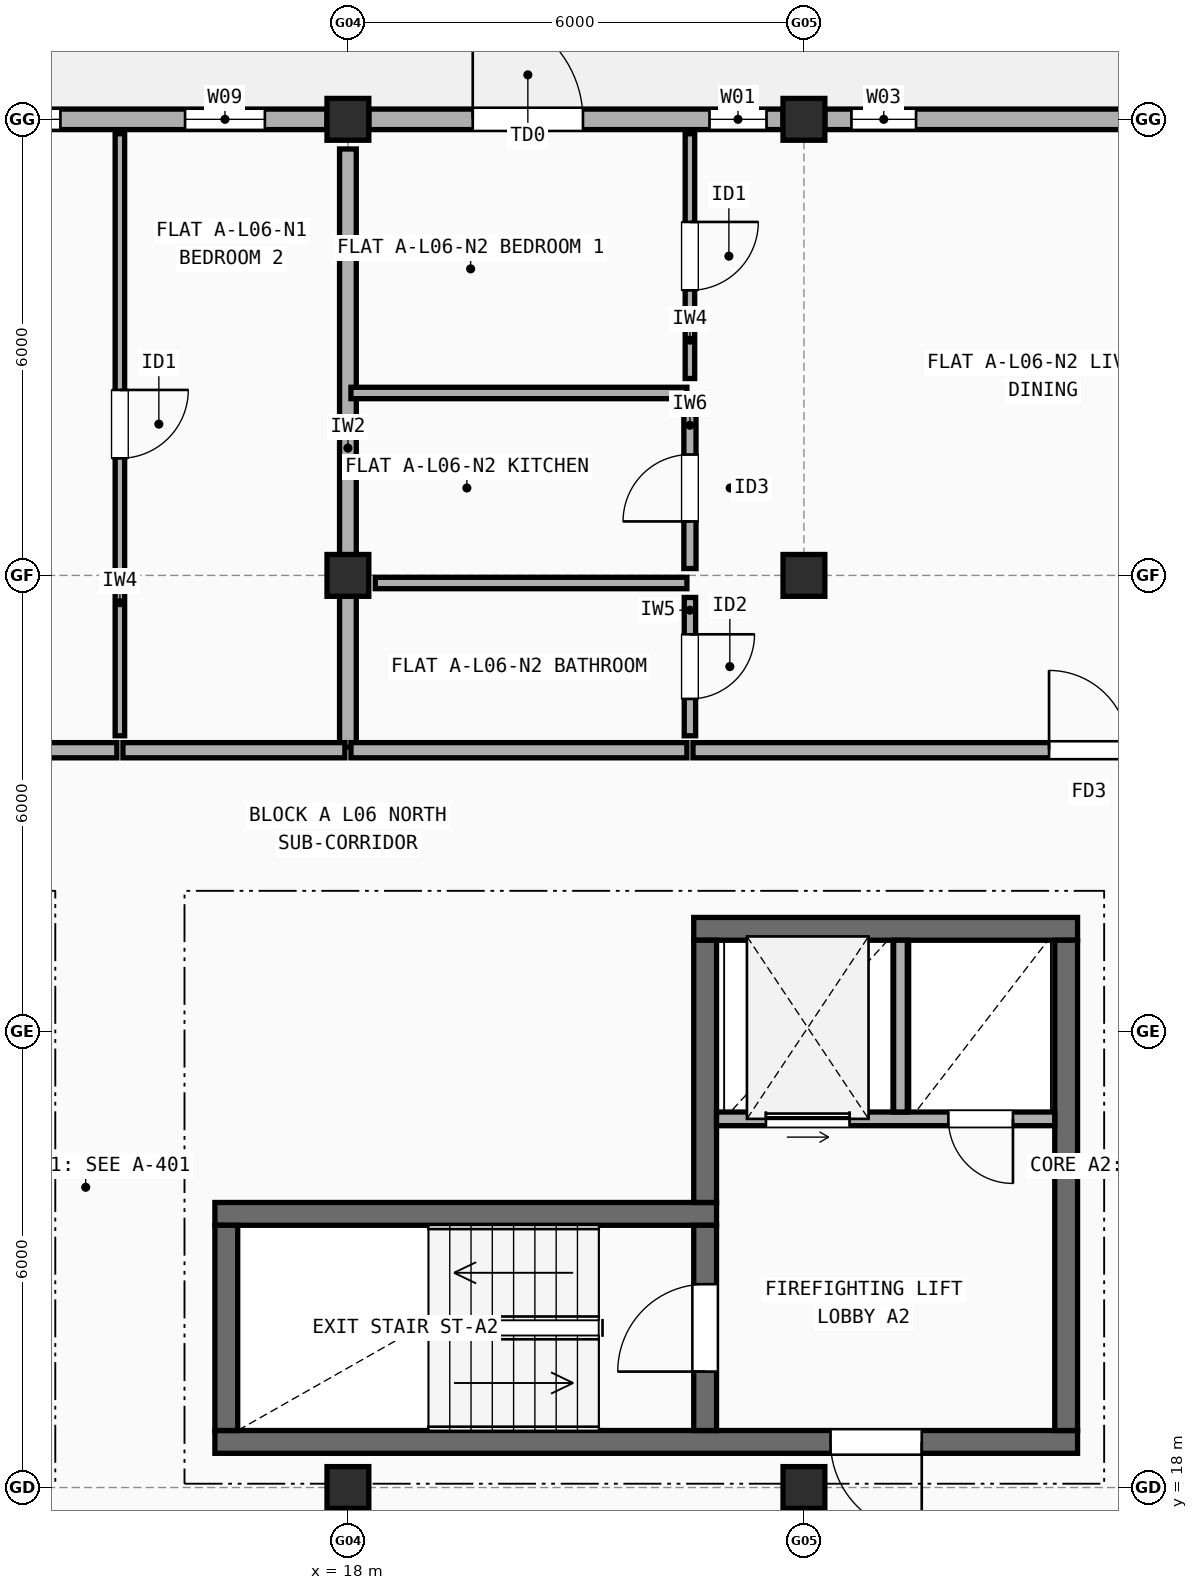
"""IFC4 building model, lengths in metres.
Left out: names, types, materials, properties, quantities, classifications, styles, units other than length and angle.
Written with IfcOpenShell. Run it as: python <this file> out.ifc"""

import sys

from ifc_helpers import new_model, si_unit, direction, frame, frame_2d, origin, origin_2d, place, context, subcontext, project, spatial, rectangle, extrude, element, fill, save


model = new_model("IFC4")
c1 = context("Model", 3, precision=1e-05, world=origin(), true_north=direction((0.0, 1.0)))
c2 = subcontext(c1, "Body", "Model", "MODEL_VIEW")
j1 = project(units=[si_unit("LENGTHUNIT", "METRE"), si_unit("PLANEANGLEUNIT", "RADIAN")], contexts=[c1])
p1 = place(None, origin())
s1 = spatial("IfcSite", under=j1, at=p1, CompositionType="ELEMENT")
p2 = place(p1, origin())
s2 = spatial("IfcBuilding", under=s1, at=p2, CompositionType="ELEMENT")
p3 = place(p2, frame((0.0, 0.0, 20.5)))
s3 = spatial("IfcBuildingStorey", under=s2, at=p3, CompositionType="ELEMENT", Elevation=20.5)
for number, where, z_axis, x_axis in (
    (1, (18.0, 18.0, 0.0), (0.0, 0.0, 1.0), (1.0, 0.0, 0.0)),
    (2, (18.0, 30.0, 0.0), (0.0, 0.0, 1.0), (1.0, 0.0, 0.0)),
    (3, (18.0, 36.0, 0.0), (0.0, 0.0, 1.0), (1.0, 0.0, 0.0)),
    (4, (24.0, 18.0, 0.0), (0.0, 0.0, 1.0), (1.0, 0.0, 0.0)),
    (5, (24.0, 30.0, 0.0), (0.0, 0.0, 1.0), (1.0, 0.0, 0.0)),
    (6, (24.0, 36.0, 0.0), (0.0, 0.0, 1.0), (1.0, 0.0, 0.0)),
):
    element("IfcColumn", number, at=place(p3, frame(where, z_axis=z_axis, x_axis=x_axis)), inside=s3, PredefinedType="COLUMN", context=c2, shape_type="SweptSolid", body=[
        extrude(rectangle(XDim=0.55, YDim=0.55, at=origin_2d()), origin(), (0.0, 0.0, 1.0), 2.97),
    ])
p4 = place(p3, frame((29.75, 36.0, 0.0), z_axis=(0.0, 0.0, 1.0), x_axis=(-1.0, 0.0, 0.0)))
e7 = element("IfcWall", 7, at=p4, inside=s3, PredefinedType="STANDARD", context=c2, shape_type="SweptSolid", body=[
    extrude(rectangle(XDim=5.475, YDim=0.27, at=frame_2d((2.738, 0.0))), origin(), (0.0, 0.0, 1.0), 2.452),
])
p5 = place(p4, frame((0.35, 0.0, 0.9)))
e8 = element("IfcOpeningElement", 8, at=p5, cuts=e7, PredefinedType="OPENING", context=c2, shape_type="SweptSolid", body=[
    extrude(rectangle(XDim=0.85, YDim=1.25, at=frame_2d((0.425, 0.625))), frame((0.0, 0.145, 0.0), z_axis=(0.0, -1.0, 0.0), x_axis=(1.0, 0.0, 0.0)), (0.0, 0.0, 1.0), 0.29),
])
p6 = place(p4, frame((4.275, 0.0, 0.9)))
e9 = element("IfcOpeningElement", 9, at=p6, cuts=e7, PredefinedType="OPENING", context=c2, shape_type="SweptSolid", body=[
    extrude(rectangle(XDim=0.85, YDim=1.25, at=frame_2d((0.425, 0.625))), frame((0.0, 0.145, 0.0), z_axis=(0.0, -1.0, 0.0), x_axis=(1.0, 0.0, 0.0)), (0.0, 0.0, 1.0), 0.29),
])
p7 = place(p3, frame((23.725, 36.0, 0.0), z_axis=(0.0, 0.0, 1.0), x_axis=(-1.0, 0.0, 0.0)))
e10 = element("IfcWall", 10, at=p7, inside=s3, PredefinedType="STANDARD", context=c2, shape_type="SweptSolid", body=[
    extrude(rectangle(XDim=5.45, YDim=0.27, at=frame_2d((2.725, 0.0))), origin(), (0.0, 0.0, 1.0), 2.452),
])
p8 = place(p7, frame((2.633, 0.0, 0.0)))
e11 = element("IfcOpeningElement", 11, at=p8, cuts=e10, PredefinedType="OPENING", context=c2, shape_type="SweptSolid", body=[
    extrude(rectangle(XDim=1.45, YDim=2.15, at=frame_2d((0.725, 1.075))), frame((0.0, 0.145, 0.0), z_axis=(0.0, -1.0, 0.0), x_axis=(1.0, 0.0, 0.0)), (0.0, 0.0, 1.0), 0.29),
])
p9 = place(p7, frame((0.218, 0.0, 0.9)))
e12 = element("IfcOpeningElement", 12, at=p9, cuts=e10, PredefinedType="OPENING", context=c2, shape_type="SweptSolid", body=[
    extrude(rectangle(XDim=0.75, YDim=1.15, at=frame_2d((0.375, 0.575))), frame((0.0, 0.145, 0.0), z_axis=(0.0, -1.0, 0.0), x_axis=(1.0, 0.0, 0.0)), (0.0, 0.0, 1.0), 0.29),
])
p10 = place(p3, frame((17.725, 36.0, 0.0), z_axis=(0.0, 0.0, 1.0), x_axis=(-1.0, 0.0, 0.0)))
e13 = element("IfcWall", 13, at=p10, inside=s3, PredefinedType="STANDARD", context=c2, shape_type="SweptSolid", body=[
    extrude(rectangle(XDim=5.45, YDim=0.27, at=frame_2d((2.725, 0.0))), origin(), (0.0, 0.0, 1.0), 2.452),
])
p11 = place(p10, frame((0.817, 0.0, 0.9)))
e14 = element("IfcOpeningElement", 14, at=p11, cuts=e13, PredefinedType="OPENING", context=c2, shape_type="SweptSolid", body=[
    extrude(rectangle(XDim=1.05, YDim=1.35, at=frame_2d((0.525, 0.675))), frame((0.0, 0.145, 0.0), z_axis=(0.0, -1.0, 0.0), x_axis=(1.0, 0.0, 0.0)), (0.0, 0.0, 1.0), 0.29),
])
p12 = place(p10, frame((3.508, 0.0, 0.9)))
e15 = element("IfcOpeningElement", 15, at=p12, cuts=e13, PredefinedType="OPENING", context=c2, shape_type="SweptSolid", body=[
    extrude(rectangle(XDim=1.2, YDim=1.35, at=frame_2d((0.6, 0.675))), frame((0.0, 0.145, 0.0), z_axis=(0.0, -1.0, 0.0), x_axis=(1.0, 0.0, 0.0)), (0.0, 0.0, 1.0), 0.29),
])
p13 = place(p3, frame((16.25, 18.6, 0.0), z_axis=(0.0, 0.0, 1.0), x_axis=(1.0, 0.0, 0.0)))
e16 = element("IfcWall", 16, at=p13, inside=s3, PredefinedType="SHEAR", context=c2, shape_type="SweptSolid", body=[
    extrude(rectangle(XDim=11.35, YDim=0.3, at=frame_2d((5.675, 0.0))), origin(), (0.0, 0.0, 1.0), 2.97),
])
p14 = place(p13, frame((8.1, 0.0, 0.0)))
e17 = element("IfcOpeningElement", 17, at=p14, cuts=e16, PredefinedType="OPENING", context=c2, shape_type="SweptSolid", body=[
    extrude(rectangle(XDim=1.2, YDim=2.15, at=frame_2d((0.6, 1.075))), frame((0.0, 0.16, 0.0), z_axis=(0.0, -1.0, 0.0), x_axis=(1.0, 0.0, 0.0)), (0.0, 0.0, 1.0), 0.32),
])
p15 = place(p3, frame((22.85, 21.6, 0.0), z_axis=(0.0, 0.0, 1.0), x_axis=(-1.0, 0.0, 0.0)))
e18 = element("IfcWall", 18, at=p15, inside=s3, PredefinedType="SHEAR", context=c2, shape_type="SweptSolid", body=[
    extrude(rectangle(XDim=6.6, YDim=0.3, at=frame_2d((3.3, 0.0))), origin(), (0.0, 0.0, 1.0), 2.97),
])
p16 = place(p3, frame((16.4, 21.45, 0.0), z_axis=(0.0, 0.0, 1.0), x_axis=(0.0, -1.0, 0.0)))
e19 = element("IfcWall", 19, at=p16, inside=s3, PredefinedType="SHEAR", context=c2, shape_type="SweptSolid", body=[
    extrude(rectangle(XDim=2.7, YDim=0.3, at=frame_2d((1.35, 0.0))), origin(), (0.0, 0.0, 1.0), 2.97),
])
p17 = place(p3, frame((22.7, 18.75, 0.0), z_axis=(0.0, 0.0, 1.0), x_axis=(0.0, 1.0, 0.0)))
e20 = element("IfcWall", 20, at=p17, inside=s3, PredefinedType="SHEAR", context=c2, shape_type="SweptSolid", body=[
    extrude(rectangle(XDim=2.7, YDim=0.3, at=frame_2d((1.35, 0.0))), origin(), (0.0, 0.0, 1.0), 2.97),
])
p18 = place(p17, frame((0.775, 0.0, 0.0)))
e21 = element("IfcOpeningElement", 21, at=p18, cuts=e20, PredefinedType="OPENING", context=c2, shape_type="SweptSolid", body=[
    extrude(rectangle(XDim=1.15, YDim=2.15, at=frame_2d((0.575, 1.075))), frame((0.0, 0.16, 0.0), z_axis=(0.0, -1.0, 0.0), x_axis=(1.0, 0.0, 0.0)), (0.0, 0.0, 1.0), 0.32),
])
p19 = place(p3, frame((27.6, 25.35, 0.0), z_axis=(0.0, 0.0, 1.0), x_axis=(-1.0, 0.0, 0.0)))
e22 = element("IfcWall", 22, at=p19, inside=s3, PredefinedType="SHEAR", context=c2, shape_type="SweptSolid", body=[
    extrude(rectangle(XDim=5.05, YDim=0.3, at=frame_2d((2.525, 0.0))), origin(), (0.0, 0.0, 1.0), 2.97),
])
p20 = place(p3, frame((27.45, 18.75, 0.0), z_axis=(0.0, 0.0, 1.0), x_axis=(0.0, 1.0, 0.0)))
e23 = element("IfcWall", 23, at=p20, inside=s3, PredefinedType="SHEAR", context=c2, shape_type="SweptSolid", body=[
    extrude(rectangle(XDim=6.45, YDim=0.3, at=frame_2d((3.225, 0.0))), origin(), (0.0, 0.0, 1.0), 2.97),
])
p21 = place(p3, frame((22.7, 21.75, 0.0), z_axis=(0.0, 0.0, 1.0), x_axis=(0.0, 1.0, 0.0)))
e24 = element("IfcWall", 24, at=p21, inside=s3, PredefinedType="SHEAR", context=c2, shape_type="SweptSolid", body=[
    extrude(rectangle(XDim=3.45, YDim=0.3, at=frame_2d((1.725, 0.0))), origin(), (0.0, 0.0, 1.0), 2.97),
])
p22 = place(p3, frame((22.85, 22.85, 0.0), z_axis=(0.0, 0.0, 1.0), x_axis=(1.0, 0.0, 0.0)))
e25 = element("IfcWall", 25, at=p22, inside=s3, PredefinedType="SOLIDWALL", context=c2, shape_type="SweptSolid", body=[
    extrude(rectangle(XDim=4.45, YDim=0.18, at=frame_2d((2.225, 0.0))), origin(), (0.0, 0.0, 1.0), 2.97),
])
p23 = place(p22, frame((0.65, 0.0, 0.0)))
e26 = element("IfcOpeningElement", 26, at=p23, cuts=e25, PredefinedType="OPENING", context=c2, shape_type="SweptSolid", body=[
    extrude(rectangle(XDim=1.1, YDim=2.15, at=frame_2d((0.55, 1.075))), frame((0.0, 0.1, 0.0), z_axis=(0.0, -1.0, 0.0), x_axis=(1.0, 0.0, 0.0)), (0.0, 0.0, 1.0), 0.2),
])
p24 = place(p22, frame((3.05, 0.0, 0.0)))
e27 = element("IfcOpeningElement", 27, at=p24, cuts=e25, PredefinedType="OPENING", context=c2, shape_type="SweptSolid", body=[
    extrude(rectangle(XDim=0.85, YDim=2.1, at=frame_2d((0.425, 1.05))), frame((0.0, 0.1, 0.0), z_axis=(0.0, -1.0, 0.0), x_axis=(1.0, 0.0, 0.0)), (0.0, 0.0, 1.0), 0.2),
])
p25 = place(p3, frame((25.27, 22.94, 0.0), z_axis=(0.0, 0.0, 1.0), x_axis=(0.0, 1.0, 0.0)))
e28 = element("IfcWall", 28, at=p25, inside=s3, PredefinedType="SOLIDWALL", context=c2, shape_type="SweptSolid", body=[
    extrude(rectangle(XDim=2.26, YDim=0.18, at=frame_2d((1.13, 0.0))), origin(), (0.0, 0.0, 1.0), 2.97),
])
p26 = place(p3, frame((18.0, 27.74, 0.0), z_axis=(0.0, 0.0, 1.0), x_axis=(0.0, 1.0, 0.0)))
e29 = element("IfcWall", 29, at=p26, inside=s3, PredefinedType="SOLIDWALL", context=c2, shape_type="SweptSolid", body=[
    extrude(rectangle(XDim=7.87, YDim=0.22, at=frame_2d((3.935, 0.0))), origin(), (0.0, 0.0, 1.0), 2.458),
])
p27 = place(p3, frame((4.54, 27.7, 0.0), z_axis=(0.0, 0.0, 1.0), x_axis=(1.0, 0.0, 0.0)))
e30 = element("IfcWall", 30, at=p27, inside=s3, PredefinedType="SOLIDWALL", context=c2, shape_type="SweptSolid", body=[
    extrude(rectangle(XDim=10.42, YDim=0.2, at=frame_2d((5.21, 0.0))), origin(), (0.0, 0.0, 1.0), 2.508),
])
p28 = place(p27, frame((4.71, 0.0, 0.0)))
e31 = element("IfcOpeningElement", 31, at=p28, cuts=e30, PredefinedType="OPENING", context=c2, shape_type="SweptSolid", body=[
    extrude(rectangle(XDim=1.0, YDim=2.15, at=frame_2d((0.5, 1.075))), frame((0.0, 0.11, 0.0), z_axis=(0.0, -1.0, 0.0), x_axis=(1.0, 0.0, 0.0)), (0.0, 0.0, 1.0), 0.22),
])
p29 = place(p3, frame((15.04, 27.7, 0.0), z_axis=(0.0, 0.0, 1.0), x_axis=(1.0, 0.0, 0.0)))
e32 = element("IfcWall", 32, at=p29, inside=s3, PredefinedType="SOLIDWALL", context=c2, shape_type="SweptSolid", body=[
    extrude(rectangle(XDim=2.92, YDim=0.2, at=frame_2d((1.46, 0.0))), origin(), (0.0, 0.0, 1.0), 2.97),
])
p30 = place(p3, frame((15.0, 27.89, 0.0), z_axis=(0.0, 0.0, 1.0), x_axis=(0.0, 1.0, 0.0)))
e33 = element("IfcWall", 33, at=p30, inside=s3, PredefinedType="PARTITIONING", context=c2, shape_type="SweptSolid", body=[
    extrude(rectangle(XDim=7.92, YDim=0.125, at=frame_2d((3.96, 0.0))), origin(), (0.0, 0.0, 1.0), 2.452),
])
p31 = place(p30, frame((3.65, 0.0, 0.0)))
e34 = element("IfcOpeningElement", 34, at=p31, cuts=e33, PredefinedType="OPENING", context=c2, shape_type="SweptSolid", body=[
    extrude(rectangle(XDim=0.9, YDim=2.1, at=frame_2d((0.45, 1.05))), frame((0.0, 0.073, 0.0), z_axis=(0.0, -1.0, 0.0), x_axis=(1.0, 0.0, 0.0)), (0.0, 0.0, 1.0), 0.145),
])
p32 = place(p3, frame((18.04, 27.7, 0.0), z_axis=(0.0, 0.0, 1.0), x_axis=(1.0, 0.0, 0.0)))
e35 = element("IfcWall", 35, at=p32, inside=s3, PredefinedType="SOLIDWALL", context=c2, shape_type="SweptSolid", body=[
    extrude(rectangle(XDim=4.42, YDim=0.2, at=frame_2d((2.21, 0.0))), origin(), (0.0, 0.0, 1.0), 2.97),
])
p33 = place(p3, frame((22.54, 27.7, 0.0), z_axis=(0.0, 0.0, 1.0), x_axis=(1.0, 0.0, 0.0)))
e36 = element("IfcWall", 36, at=p33, inside=s3, PredefinedType="SOLIDWALL", context=c2, shape_type="SweptSolid", body=[
    extrude(rectangle(XDim=10.42, YDim=0.2, at=frame_2d((5.21, 0.0))), origin(), (0.0, 0.0, 1.0), 2.452),
])
p34 = place(p33, frame((4.685, 0.0, 0.0)))
e37 = element("IfcOpeningElement", 37, at=p34, cuts=e36, PredefinedType="OPENING", context=c2, shape_type="SweptSolid", body=[
    extrude(rectangle(XDim=1.05, YDim=2.15, at=frame_2d((0.525, 1.075))), frame((0.0, 0.11, 0.0), z_axis=(0.0, -1.0, 0.0), x_axis=(1.0, 0.0, 0.0)), (0.0, 0.0, 1.0), 0.22),
])
p35 = place(p3, frame((22.5, 32.59, 0.0), z_axis=(0.0, 0.0, 1.0), x_axis=(0.0, 1.0, 0.0)))
e38 = element("IfcWall", 38, at=p35, inside=s3, PredefinedType="PARTITIONING", context=c2, shape_type="SweptSolid", body=[
    extrude(rectangle(XDim=3.22, YDim=0.125, at=frame_2d((1.61, 0.0))), origin(), (0.0, 0.0, 1.0), 2.97),
])
p36 = place(p35, frame((1.16, 0.0, 0.0)))
e39 = element("IfcOpeningElement", 39, at=p36, cuts=e38, PredefinedType="OPENING", context=c2, shape_type="SweptSolid", body=[
    extrude(rectangle(XDim=0.9, YDim=2.1, at=frame_2d((0.45, 1.05))), frame((0.0, 0.073, 0.0), z_axis=(0.0, -1.0, 0.0), x_axis=(1.0, 0.0, 0.0)), (0.0, 0.0, 1.0), 0.145),
])
p37 = place(p3, frame((22.5, 30.09, 0.0), z_axis=(0.0, 0.0, 1.0), x_axis=(0.0, 1.0, 0.0)))
e40 = element("IfcWall", 40, at=p37, inside=s3, PredefinedType="PLUMBINGWALL", context=c2, shape_type="SweptSolid", body=[
    extrude(rectangle(XDim=2.12, YDim=0.16, at=frame_2d((1.06, 0.0))), origin(), (0.0, 0.0, 1.0), 2.452),
])
p38 = place(p37, frame((0.62, 0.0, 0.0)))
e41 = element("IfcOpeningElement", 41, at=p38, cuts=e40, PredefinedType="OPENING", context=c2, shape_type="SweptSolid", body=[
    extrude(rectangle(XDim=0.88, YDim=2.1, at=frame_2d((0.44, 1.05))), frame((0.0, 0.09, 0.0), z_axis=(0.0, -1.0, 0.0), x_axis=(1.0, 0.0, 0.0)), (0.0, 0.0, 1.0), 0.18),
])
p39 = place(p3, frame((22.5, 27.89, 0.0), z_axis=(0.0, 0.0, 1.0), x_axis=(0.0, 1.0, 0.0)))
e42 = element("IfcWall", 42, at=p39, inside=s3, PredefinedType="PARTITIONING", context=c2, shape_type="SweptSolid", body=[
    extrude(rectangle(XDim=1.82, YDim=0.15, at=frame_2d((0.91, 0.0))), origin(), (0.0, 0.0, 1.0), 2.97),
])
p40 = place(p39, frame((0.485, 0.0, 0.0)))
e43 = element("IfcOpeningElement", 43, at=p40, cuts=e42, PredefinedType="OPENING", context=c2, shape_type="SweptSolid", body=[
    extrude(rectangle(XDim=0.85, YDim=2.1, at=frame_2d((0.425, 1.05))), frame((0.0, 0.085, 0.0), z_axis=(0.0, -1.0, 0.0), x_axis=(1.0, 0.0, 0.0)), (0.0, 0.0, 1.0), 0.17),
])
p41 = place(p3, frame((18.04, 32.4, 0.0), z_axis=(0.0, 0.0, 1.0), x_axis=(1.0, 0.0, 0.0)))
e44 = element("IfcWall", 44, at=p41, inside=s3, PredefinedType="PARTITIONING", context=c2, shape_type="SweptSolid", body=[
    extrude(rectangle(XDim=4.42, YDim=0.15, at=frame_2d((2.21, 0.0))), origin(), (0.0, 0.0, 1.0), 2.458),
])
p42 = place(p3, frame((18.36, 29.9, 0.0), z_axis=(0.0, 0.0, 1.0), x_axis=(1.0, 0.0, 0.0)))
e45 = element("IfcWall", 45, at=p42, inside=s3, PredefinedType="PARTITIONING", context=c2, shape_type="SweptSolid", body=[
    extrude(rectangle(XDim=4.1, YDim=0.15, at=frame_2d((2.05, 0.0))), origin(), (0.0, 0.0, 1.0), 2.452),
])
p43 = place(p6, origin())
e46 = element("IfcWindow", 46, at=p43, inside=s3, PartitioningType="SINGLE_PANEL", PredefinedType="WINDOW", context=c2, shape_type="SweptSolid", body=[
    extrude(rectangle(XDim=0.85, YDim=1.25, at=frame_2d((0.425, 0.625))), frame((0.0, 0.03, 0.0), z_axis=(0.0, -1.0, 0.0), x_axis=(1.0, 0.0, 0.0)), (0.0, 0.0, 1.0), 0.06),
])
fill(e9, e46)
p44 = place(p8, frame((1.45, 0.0, 0.0), z_axis=(0.0, 0.0, 1.0), x_axis=(-1.0, 0.0, 0.0)))
e47 = element("IfcDoor", 47, at=p44, inside=s3, OperationType="SINGLE_SWING_RIGHT", PredefinedType="DOOR", context=c2, shape_type="SweptSolid", body=[
    extrude(rectangle(XDim=1.45, YDim=2.15, at=frame_2d((0.725, 1.075))), frame((0.0, 0.025, 0.0), z_axis=(0.0, -1.0, 0.0), x_axis=(1.0, 0.0, 0.0)), (0.0, 0.0, 1.0), 0.05),
])
fill(e11, e47)
p45 = place(p9, origin())
e48 = element("IfcWindow", 48, at=p45, inside=s3, PartitioningType="SINGLE_PANEL", PredefinedType="WINDOW", context=c2, shape_type="SweptSolid", body=[
    extrude(rectangle(XDim=0.75, YDim=1.15, at=frame_2d((0.375, 0.575))), frame((0.0, 0.03, 0.0), z_axis=(0.0, -1.0, 0.0), x_axis=(1.0, 0.0, 0.0)), (0.0, 0.0, 1.0), 0.06),
])
fill(e12, e48)
p46 = place(p11, origin())
e49 = element("IfcWindow", 49, at=p46, inside=s3, PartitioningType="SINGLE_PANEL", PredefinedType="WINDOW", context=c2, shape_type="SweptSolid", body=[
    extrude(rectangle(XDim=1.05, YDim=1.35, at=frame_2d((0.525, 0.675))), frame((0.0, 0.03, 0.0), z_axis=(0.0, -1.0, 0.0), x_axis=(1.0, 0.0, 0.0)), (0.0, 0.0, 1.0), 0.06),
])
fill(e14, e49)
p47 = place(p12, origin())
e50 = element("IfcWindow", 50, at=p47, inside=s3, PartitioningType="SINGLE_PANEL", PredefinedType="WINDOW", context=c2, shape_type="SweptSolid", body=[
    extrude(rectangle(XDim=1.2, YDim=1.35, at=frame_2d((0.6, 0.675))), frame((0.0, 0.03, 0.0), z_axis=(0.0, -1.0, 0.0), x_axis=(1.0, 0.0, 0.0)), (0.0, 0.0, 1.0), 0.06),
])
fill(e15, e50)
p48 = place(p14, origin())
e51 = element("IfcDoor", 51, at=p48, inside=s3, OperationType="SINGLE_SWING_RIGHT", PredefinedType="DOOR", context=c2, shape_type="SweptSolid", body=[
    extrude(rectangle(XDim=1.2, YDim=2.15, at=frame_2d((0.6, 1.075))), frame((0.0, 0.025, 0.0), z_axis=(0.0, -1.0, 0.0), x_axis=(1.0, 0.0, 0.0)), (0.0, 0.0, 1.0), 0.05),
])
fill(e17, e51)
p49 = place(p18, origin())
e52 = element("IfcDoor", 52, at=p49, inside=s3, OperationType="SINGLE_SWING_LEFT", PredefinedType="DOOR", context=c2, shape_type="SweptSolid", body=[
    extrude(rectangle(XDim=1.15, YDim=2.15, at=frame_2d((0.575, 1.075))), frame((0.0, 0.025, 0.0), z_axis=(0.0, -1.0, 0.0), x_axis=(1.0, 0.0, 0.0)), (0.0, 0.0, 1.0), 0.05),
])
fill(e21, e52)
p50 = place(p23, origin())
e53 = element("IfcDoor", 53, at=p50, inside=s3, OperationType="SLIDING_TO_LEFT", PredefinedType="DOOR", context=c2, shape_type="SweptSolid", body=[
    extrude(rectangle(XDim=1.1, YDim=2.15, at=frame_2d((0.55, 1.075))), frame((0.0, 0.025, 0.0), z_axis=(0.0, -1.0, 0.0), x_axis=(1.0, 0.0, 0.0)), (0.0, 0.0, 1.0), 0.05),
])
fill(e26, e53)
p51 = place(p24, frame((0.85, 0.0, 0.0), z_axis=(0.0, 0.0, 1.0), x_axis=(-1.0, 0.0, 0.0)))
e54 = element("IfcDoor", 54, at=p51, inside=s3, OperationType="SINGLE_SWING_RIGHT", PredefinedType="DOOR", context=c2, shape_type="SweptSolid", body=[
    extrude(rectangle(XDim=0.85, YDim=2.1, at=frame_2d((0.425, 1.05))), frame((0.0, 0.025, 0.0), z_axis=(0.0, -1.0, 0.0), x_axis=(1.0, 0.0, 0.0)), (0.0, 0.0, 1.0), 0.05),
])
fill(e27, e54)
p52 = place(p31, origin())
e55 = element("IfcDoor", 55, at=p52, inside=s3, OperationType="SINGLE_SWING_RIGHT", PredefinedType="DOOR", context=c2, shape_type="SweptSolid", body=[
    extrude(rectangle(XDim=0.9, YDim=2.1, at=frame_2d((0.45, 1.05))), frame((0.0, 0.025, 0.0), z_axis=(0.0, -1.0, 0.0), x_axis=(1.0, 0.0, 0.0)), (0.0, 0.0, 1.0), 0.05),
])
fill(e34, e55)
p53 = place(p34, origin())
e56 = element("IfcDoor", 56, at=p53, inside=s3, OperationType="SINGLE_SWING_LEFT", PredefinedType="DOOR", context=c2, shape_type="SweptSolid", body=[
    extrude(rectangle(XDim=1.05, YDim=2.15, at=frame_2d((0.525, 1.075))), frame((0.0, 0.025, 0.0), z_axis=(0.0, -1.0, 0.0), x_axis=(1.0, 0.0, 0.0)), (0.0, 0.0, 1.0), 0.05),
])
fill(e37, e56)
p54 = place(p36, origin())
e57 = element("IfcDoor", 57, at=p54, inside=s3, OperationType="SINGLE_SWING_RIGHT", PredefinedType="DOOR", context=c2, shape_type="SweptSolid", body=[
    extrude(rectangle(XDim=0.9, YDim=2.1, at=frame_2d((0.45, 1.05))), frame((0.0, 0.025, 0.0), z_axis=(0.0, -1.0, 0.0), x_axis=(1.0, 0.0, 0.0)), (0.0, 0.0, 1.0), 0.05),
])
fill(e39, e57)
p55 = place(p38, origin())
e58 = element("IfcDoor", 58, at=p55, inside=s3, OperationType="SINGLE_SWING_LEFT", PredefinedType="DOOR", context=c2, shape_type="SweptSolid", body=[
    extrude(rectangle(XDim=0.88, YDim=2.1, at=frame_2d((0.44, 1.05))), frame((0.0, 0.025, 0.0), z_axis=(0.0, -1.0, 0.0), x_axis=(1.0, 0.0, 0.0)), (0.0, 0.0, 1.0), 0.05),
])
fill(e41, e58)
p56 = place(p40, origin())
e59 = element("IfcDoor", 59, at=p56, inside=s3, OperationType="SINGLE_SWING_RIGHT", PredefinedType="DOOR", context=c2, shape_type="SweptSolid", body=[
    extrude(rectangle(XDim=0.85, YDim=2.1, at=frame_2d((0.425, 1.05))), frame((0.0, 0.025, 0.0), z_axis=(0.0, -1.0, 0.0), x_axis=(1.0, 0.0, 0.0)), (0.0, 0.0, 1.0), 0.05),
])
fill(e43, e59)
save(model, sys.argv[1])
